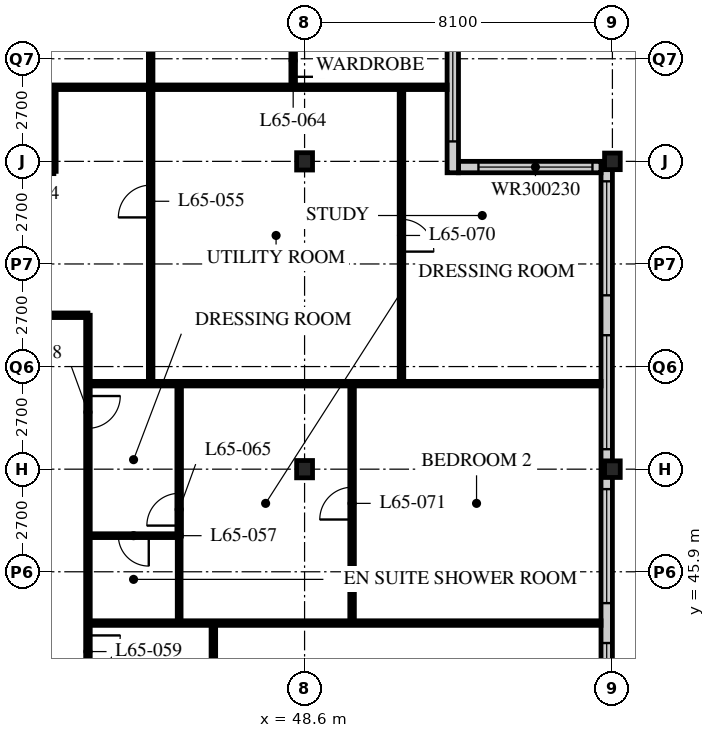
"""IFC4 building model, lengths in metres.
Left out: names, types, materials, properties, quantities, classifications, styles, units other than length and angle.
Written with IfcOpenShell. Run it as: python <this file> out.ifc"""

import sys

from ifc_helpers import new_model, si_unit, direction, frame, frame_2d, origin, origin_2d, place, context, subcontext, project, spatial, rectangle, i_section, extrude, element, fill, save


model = new_model("IFC4")
c1 = context("Model", 3, precision=1e-05, world=origin(), true_north=direction((0.0, 1.0)))
c2 = subcontext(c1, "Body", "Model", "MODEL_VIEW")
j1 = project(units=[si_unit("LENGTHUNIT", "METRE"), si_unit("PLANEANGLEUNIT", "RADIAN")], contexts=[c1])
p1 = place(None, origin())
s1 = spatial("IfcSite", under=j1, at=p1, CompositionType="ELEMENT")
p2 = place(p1, origin())
s2 = spatial("IfcBuilding", under=s1, at=p2, CompositionType="ELEMENT")
p3 = place(p2, frame((0.0, 0.0, 254.1)))
s3 = spatial("IfcBuildingStorey", under=s2, at=p3, CompositionType="ELEMENT", Elevation=254.1)
for number, where, z_axis, x_axis in (
    (1, (48.6, 48.6, 0.0), (0.0, 0.0, 1.0), (1.0, 0.0, 0.0)),
    (2, (48.6, 56.7, 0.0), (0.0, 0.0, 1.0), (1.0, 0.0, 0.0)),
):
    element("IfcColumn", number, at=place(p3, frame(where, z_axis=z_axis, x_axis=x_axis)), inside=s3, PredefinedType="COLUMN", context=c2, shape_type="SweptSolid", body=[
        extrude(i_section(OverallWidth=0.418, OverallDepth=0.456, WebThickness=0.042, FlangeThickness=0.067, FilletRadius=0.015, at=origin_2d()), origin(), (0.0, 0.0, 1.0), 3.9),
    ])
for number, where, z_axis, x_axis in (
    (3, (56.7, 48.6, 0.0), (0.0, 0.0, 1.0), (1.0, 0.0, 0.0)),
    (4, (56.7, 56.7, 0.0), (0.0, 0.0, 1.0), (1.0, 0.0, 0.0)),
):
    element("IfcColumn", number, at=place(p3, frame(where, z_axis=z_axis, x_axis=x_axis)), inside=s3, PredefinedType="COLUMN", context=c2, shape_type="SweptSolid", body=[
        extrude(i_section(OverallWidth=0.412, OverallDepth=0.437, WebThickness=0.036, FlangeThickness=0.058, FilletRadius=0.015, at=origin_2d()), origin(), (0.0, 0.0, 1.0), 3.9),
    ])
p4 = place(p3, frame((56.55, 24.6, 0.0), z_axis=(0.0, 0.0, 1.0), x_axis=(0.0, 1.0, 0.0)))
e5 = element("IfcWall", 5, at=p4, inside=s3, PredefinedType="SOLIDWALL", context=c2, shape_type="SweptSolid", body=[
    extrude(rectangle(XDim=32.1, YDim=0.3, at=frame_2d((16.05, 0.0))), origin(), (0.0, 0.0, 1.0), 3.69),
])
p5 = place(p4, frame((0.225, 0.0, 0.6)))
e6 = element("IfcOpeningElement", 6, at=p5, cuts=e5, PredefinedType="OPENING", context=c2, shape_type="SweptSolid", body=[
    extrude(rectangle(XDim=3.0, YDim=2.4, at=frame_2d((1.5, 1.2))), frame((0.0, 0.16, 0.0), z_axis=(0.0, -1.0, 0.0), x_axis=(1.0, 0.0, 0.0)), (0.0, 0.0, 1.0), 0.32),
])
p6 = place(p4, frame((4.275, 0.0, 0.6)))
e7 = element("IfcOpeningElement", 7, at=p6, cuts=e5, PredefinedType="OPENING", context=c2, shape_type="SweptSolid", body=[
    extrude(rectangle(XDim=3.0, YDim=2.4, at=frame_2d((1.5, 1.2))), frame((0.0, 0.16, 0.0), z_axis=(0.0, -1.0, 0.0), x_axis=(1.0, 0.0, 0.0)), (0.0, 0.0, 1.0), 0.32),
])
p7 = place(p4, frame((8.325, 0.0, 0.6)))
e8 = element("IfcOpeningElement", 8, at=p7, cuts=e5, PredefinedType="OPENING", context=c2, shape_type="SweptSolid", body=[
    extrude(rectangle(XDim=3.0, YDim=2.4, at=frame_2d((1.5, 1.2))), frame((0.0, 0.16, 0.0), z_axis=(0.0, -1.0, 0.0), x_axis=(1.0, 0.0, 0.0)), (0.0, 0.0, 1.0), 0.32),
])
p8 = place(p4, frame((12.375, 0.0, 0.6)))
e9 = element("IfcOpeningElement", 9, at=p8, cuts=e5, PredefinedType="OPENING", context=c2, shape_type="SweptSolid", body=[
    extrude(rectangle(XDim=3.0, YDim=2.4, at=frame_2d((1.5, 1.2))), frame((0.0, 0.16, 0.0), z_axis=(0.0, -1.0, 0.0), x_axis=(1.0, 0.0, 0.0)), (0.0, 0.0, 1.0), 0.32),
])
p9 = place(p4, frame((16.425, 0.0, 0.6)))
e10 = element("IfcOpeningElement", 10, at=p9, cuts=e5, PredefinedType="OPENING", context=c2, shape_type="SweptSolid", body=[
    extrude(rectangle(XDim=3.0, YDim=2.4, at=frame_2d((1.5, 1.2))), frame((0.0, 0.16, 0.0), z_axis=(0.0, -1.0, 0.0), x_axis=(1.0, 0.0, 0.0)), (0.0, 0.0, 1.0), 0.32),
])
p10 = place(p4, frame((20.475, 0.0, 0.6)))
e11 = element("IfcOpeningElement", 11, at=p10, cuts=e5, PredefinedType="OPENING", context=c2, shape_type="SweptSolid", body=[
    extrude(rectangle(XDim=3.0, YDim=2.4, at=frame_2d((1.5, 1.2))), frame((0.0, 0.16, 0.0), z_axis=(0.0, -1.0, 0.0), x_axis=(1.0, 0.0, 0.0)), (0.0, 0.0, 1.0), 0.32),
])
p11 = place(p4, frame((24.525, 0.0, 0.6)))
e12 = element("IfcOpeningElement", 12, at=p11, cuts=e5, PredefinedType="OPENING", context=c2, shape_type="SweptSolid", body=[
    extrude(rectangle(XDim=3.0, YDim=2.4, at=frame_2d((1.5, 1.2))), frame((0.0, 0.16, 0.0), z_axis=(0.0, -1.0, 0.0), x_axis=(1.0, 0.0, 0.0)), (0.0, 0.0, 1.0), 0.32),
])
p12 = place(p4, frame((28.575, 0.0, 0.6)))
e13 = element("IfcOpeningElement", 13, at=p12, cuts=e5, PredefinedType="OPENING", context=c2, shape_type="SweptSolid", body=[
    extrude(rectangle(XDim=3.0, YDim=2.4, at=frame_2d((1.5, 1.2))), frame((0.0, 0.16, 0.0), z_axis=(0.0, -1.0, 0.0), x_axis=(1.0, 0.0, 0.0)), (0.0, 0.0, 1.0), 0.32),
])
p13 = place(p3, frame((56.4, 56.55, 0.0), z_axis=(0.0, 0.0, 1.0), x_axis=(-1.0, 0.0, 0.0)))
e14 = element("IfcWall", 14, at=p13, inside=s3, PredefinedType="SOLIDWALL", context=c2, shape_type="SweptSolid", body=[
    extrude(rectangle(XDim=3.75, YDim=0.3, at=frame_2d((1.875, 0.0))), origin(), (0.0, 0.0, 1.0), 3.69),
])
p14 = place(p13, frame((0.225, 0.0, 0.6)))
e15 = element("IfcOpeningElement", 15, at=p14, cuts=e14, PredefinedType="OPENING", context=c2, shape_type="SweptSolid", body=[
    extrude(rectangle(XDim=3.0, YDim=2.3, at=frame_2d((1.5, 1.15))), frame((0.0, 0.16, 0.0), z_axis=(0.0, -1.0, 0.0), x_axis=(1.0, 0.0, 0.0)), (0.0, 0.0, 1.0), 0.32),
])
p15 = place(p3, frame((52.5, 56.4, 0.0), z_axis=(0.0, 0.0, 1.0), x_axis=(0.0, 1.0, 0.0)))
e16 = element("IfcWall", 16, at=p15, inside=s3, PredefinedType="SOLIDWALL", context=c2, shape_type="SweptSolid", body=[
    extrude(rectangle(XDim=4.35, YDim=0.3, at=frame_2d((2.175, 0.0))), origin(), (0.0, 0.0, 1.0), 3.69),
])
p16 = place(p15, frame((0.825, 0.0, 0.6)))
e17 = element("IfcOpeningElement", 17, at=p16, cuts=e16, PredefinedType="OPENING", context=c2, shape_type="SweptSolid", body=[
    extrude(rectangle(XDim=3.0, YDim=2.3, at=frame_2d((1.5, 1.15))), frame((0.0, 0.16, 0.0), z_axis=(0.0, -1.0, 0.0), x_axis=(1.0, 0.0, 0.0)), (0.0, 0.0, 1.0), 0.32),
])
p17 = place(p3, frame((42.9, 52.65, 0.0), z_axis=(0.0, 0.0, 1.0), x_axis=(0.0, -1.0, 0.0)))
e18 = element("IfcWall", 18, at=p17, inside=s3, PredefinedType="PARTITIONING", context=c2, shape_type="SweptSolid", body=[
    extrude(rectangle(XDim=16.2, YDim=0.12, at=frame_2d((8.1, 0.0))), origin(), (0.0, 0.0, 1.0), 3.69),
])
p18 = place(p17, frame((2.125, 0.0, 0.0)))
e19 = element("IfcOpeningElement", 19, at=p18, cuts=e18, PredefinedType="OPENING", context=c2, shape_type="SweptSolid", body=[
    extrude(rectangle(XDim=0.85, YDim=2.1, at=frame_2d((0.425, 1.05))), frame((0.0, 0.07, 0.0), z_axis=(0.0, -1.0, 0.0), x_axis=(1.0, 0.0, 0.0)), (0.0, 0.0, 1.0), 0.14),
])
p19 = place(p17, frame((8.425, 0.0, 0.0)))
e20 = element("IfcOpeningElement", 20, at=p19, cuts=e18, PredefinedType="OPENING", context=c2, shape_type="SweptSolid", body=[
    extrude(rectangle(XDim=0.85, YDim=2.1, at=frame_2d((0.425, 1.05))), frame((0.0, 0.07, 0.0), z_axis=(0.0, -1.0, 0.0), x_axis=(1.0, 0.0, 0.0)), (0.0, 0.0, 1.0), 0.14),
])
p20 = place(p17, frame((12.475, 0.0, 0.0)))
e21 = element("IfcOpeningElement", 21, at=p20, cuts=e18, PredefinedType="OPENING", context=c2, shape_type="SweptSolid", body=[
    extrude(rectangle(XDim=0.85, YDim=2.1, at=frame_2d((0.425, 1.05))), frame((0.0, 0.07, 0.0), z_axis=(0.0, -1.0, 0.0), x_axis=(1.0, 0.0, 0.0)), (0.0, 0.0, 1.0), 0.14),
])
p21 = place(p3, frame((36.45, 52.65, 0.0), z_axis=(0.0, 0.0, 1.0), x_axis=(1.0, 0.0, 0.0)))
e22 = element("IfcWall", 22, at=p21, inside=s3, PredefinedType="PARTITIONING", context=c2, shape_type="SweptSolid", body=[
    extrude(rectangle(XDim=6.45, YDim=0.12, at=frame_2d((3.225, 0.0))), origin(), (0.0, 0.0, 1.0), 3.69),
])
p22 = place(p21, frame((2.8, 0.0, 0.0)))
e23 = element("IfcOpeningElement", 23, at=p22, cuts=e22, PredefinedType="OPENING", context=c2, shape_type="SweptSolid", body=[
    extrude(rectangle(XDim=0.85, YDim=2.1, at=frame_2d((0.425, 1.05))), frame((0.0, 0.07, 0.0), z_axis=(0.0, -1.0, 0.0), x_axis=(1.0, 0.0, 0.0)), (0.0, 0.0, 1.0), 0.14),
])
p23 = place(p3, frame((42.9, 50.85, 0.0), z_axis=(0.0, 0.0, 1.0), x_axis=(1.0, 0.0, 0.0)))
e24 = element("IfcWall", 24, at=p23, inside=s3, PredefinedType="PARTITIONING", context=c2, shape_type="SweptSolid", body=[
    extrude(rectangle(XDim=13.5, YDim=0.12, at=frame_2d((6.75, 0.0))), origin(), (0.0, 0.0, 1.0), 3.69),
])
p24 = place(p3, frame((36.45, 58.65, 0.0), z_axis=(0.0, 0.0, 1.0), x_axis=(1.0, 0.0, 0.0)))
e25 = element("IfcWall", 25, at=p24, inside=s3, PredefinedType="PARTITIONING", context=c2, shape_type="SweptSolid", body=[
    extrude(rectangle(XDim=15.9, YDim=0.12, at=frame_2d((7.95, 0.0))), origin(), (0.0, 0.0, 1.0), 3.69),
])
p25 = place(p24, frame((1.675, 0.0, 0.0)))
e26 = element("IfcOpeningElement", 26, at=p25, cuts=e25, PredefinedType="OPENING", context=c2, shape_type="SweptSolid", body=[
    extrude(rectangle(XDim=0.85, YDim=2.1, at=frame_2d((0.425, 1.05))), frame((0.0, 0.07, 0.0), z_axis=(0.0, -1.0, 0.0), x_axis=(1.0, 0.0, 0.0)), (0.0, 0.0, 1.0), 0.14),
])
p26 = place(p3, frame((44.55, 64.5, 0.0), z_axis=(0.0, 0.0, 1.0), x_axis=(0.0, -1.0, 0.0)))
e27 = element("IfcWall", 27, at=p26, inside=s3, PredefinedType="PARTITIONING", context=c2, shape_type="SweptSolid", body=[
    extrude(rectangle(XDim=13.65, YDim=0.12, at=frame_2d((6.825, 0.0))), origin(), (0.0, 0.0, 1.0), 3.69),
])
p27 = place(p26, frame((8.425, 0.0, 0.0)))
e28 = element("IfcOpeningElement", 28, at=p27, cuts=e27, PredefinedType="OPENING", context=c2, shape_type="SweptSolid", body=[
    extrude(rectangle(XDim=0.85, YDim=2.1, at=frame_2d((0.425, 1.05))), frame((0.0, 0.07, 0.0), z_axis=(0.0, -1.0, 0.0), x_axis=(1.0, 0.0, 0.0)), (0.0, 0.0, 1.0), 0.14),
])
p28 = place(p26, frame((2.5, 0.0, 0.0)))
e29 = element("IfcOpeningElement", 29, at=p28, cuts=e27, PredefinedType="OPENING", context=c2, shape_type="SweptSolid", body=[
    extrude(rectangle(XDim=0.85, YDim=2.1, at=frame_2d((0.425, 1.05))), frame((0.0, 0.07, 0.0), z_axis=(0.0, -1.0, 0.0), x_axis=(1.0, 0.0, 0.0)), (0.0, 0.0, 1.0), 0.14),
])
p29 = place(p3, frame((42.9, 46.85, 0.0), z_axis=(0.0, 0.0, 1.0), x_axis=(1.0, 0.0, 0.0)))
e30 = element("IfcWall", 30, at=p29, inside=s3, PredefinedType="PARTITIONING", context=c2, shape_type="SweptSolid", body=[
    extrude(rectangle(XDim=2.4, YDim=0.1, at=frame_2d((1.2, 0.0))), origin(), (0.0, 0.0, 1.0), 3.69),
])
p30 = place(p29, frame((0.8, 0.0, 0.0)))
e31 = element("IfcOpeningElement", 31, at=p30, cuts=e30, PredefinedType="OPENING", context=c2, shape_type="SweptSolid", body=[
    extrude(rectangle(XDim=0.8, YDim=2.1, at=frame_2d((0.4, 1.05))), frame((0.0, 0.06, 0.0), z_axis=(0.0, -1.0, 0.0), x_axis=(1.0, 0.0, 0.0)), (0.0, 0.0, 1.0), 0.12),
])
p31 = place(p3, frame((45.3, 46.85, 0.0), z_axis=(0.0, 0.0, 1.0), x_axis=(0.0, -1.0, 0.0)))
e32 = element("IfcWall", 32, at=p31, inside=s3, PredefinedType="PARTITIONING", context=c2, shape_type="SweptSolid", body=[
    extrude(rectangle(XDim=2.3, YDim=0.1, at=frame_2d((1.15, 0.0))), origin(), (0.0, 0.0, 1.0), 3.69),
])
p32 = place(p3, frame((42.9, 44.55, 0.0), z_axis=(0.0, 0.0, 1.0), x_axis=(1.0, 0.0, 0.0)))
e33 = element("IfcWall", 33, at=p32, inside=s3, PredefinedType="PARTITIONING", context=c2, shape_type="SweptSolid", body=[
    extrude(rectangle(XDim=13.5, YDim=0.12, at=frame_2d((6.75, 0.0))), origin(), (0.0, 0.0, 1.0), 3.69),
])
p33 = place(p3, frame((48.3, 58.65, 0.0), z_axis=(0.0, 0.0, 1.0), x_axis=(0.0, 1.0, 0.0)))
e34 = element("IfcWall", 34, at=p33, inside=s3, PredefinedType="PARTITIONING", context=c2, shape_type="SweptSolid", body=[
    extrude(rectangle(XDim=1.8, YDim=0.12, at=frame_2d((0.9, 0.0))), origin(), (0.0, 0.0, 1.0), 3.69),
])
p34 = place(p33, frame((0.275, 0.0, 0.0)))
e35 = element("IfcOpeningElement", 35, at=p34, cuts=e34, PredefinedType="OPENING", context=c2, shape_type="SweptSolid", body=[
    extrude(rectangle(XDim=0.85, YDim=2.1, at=frame_2d((0.425, 1.05))), frame((0.0, 0.07, 0.0), z_axis=(0.0, -1.0, 0.0), x_axis=(1.0, 0.0, 0.0)), (0.0, 0.0, 1.0), 0.14),
])
p35 = place(p3, frame((45.3, 50.85, 0.0), z_axis=(0.0, 0.0, 1.0), x_axis=(0.0, -1.0, 0.0)))
e36 = element("IfcWall", 36, at=p35, inside=s3, PredefinedType="PARTITIONING", context=c2, shape_type="SweptSolid", body=[
    extrude(rectangle(XDim=4.01, YDim=0.12, at=frame_2d((2.005, 0.0))), origin(), (0.0, 0.0, 1.0), 3.69),
])
p36 = place(p35, frame((2.885, 0.0, 0.0)))
e37 = element("IfcOpeningElement", 37, at=p36, cuts=e36, PredefinedType="OPENING", context=c2, shape_type="SweptSolid", body=[
    extrude(rectangle(XDim=0.85, YDim=2.1, at=frame_2d((0.425, 1.05))), frame((0.0, 0.07, 0.0), z_axis=(0.0, -1.0, 0.0), x_axis=(1.0, 0.0, 0.0)), (0.0, 0.0, 1.0), 0.14),
])
p37 = place(p3, frame((46.2, 28.35, 0.0), z_axis=(0.0, 0.0, 1.0), x_axis=(0.0, 1.0, 0.0)))
e38 = element("IfcWall", 38, at=p37, inside=s3, PredefinedType="PARTITIONING", context=c2, shape_type="SweptSolid", body=[
    extrude(rectangle(XDim=16.2, YDim=0.12, at=frame_2d((8.1, 0.0))), origin(), (0.0, 0.0, 1.0), 3.69),
])
p38 = place(p37, frame((1.6, 0.0, 0.0)))
e39 = element("IfcOpeningElement", 39, at=p38, cuts=e38, PredefinedType="OPENING", context=c2, shape_type="SweptSolid", body=[
    extrude(rectangle(XDim=0.85, YDim=2.1, at=frame_2d((0.425, 1.05))), frame((0.0, 0.07, 0.0), z_axis=(0.0, -1.0, 0.0), x_axis=(1.0, 0.0, 0.0)), (0.0, 0.0, 1.0), 0.14),
])
p39 = place(p37, frame((5.65, 0.0, 0.0)))
e40 = element("IfcOpeningElement", 40, at=p39, cuts=e38, PredefinedType="OPENING", context=c2, shape_type="SweptSolid", body=[
    extrude(rectangle(XDim=0.85, YDim=2.1, at=frame_2d((0.425, 1.05))), frame((0.0, 0.07, 0.0), z_axis=(0.0, -1.0, 0.0), x_axis=(1.0, 0.0, 0.0)), (0.0, 0.0, 1.0), 0.14),
])
p40 = place(p37, frame((13.75, 0.0, 0.0)))
e41 = element("IfcOpeningElement", 41, at=p40, cuts=e38, PredefinedType="OPENING", context=c2, shape_type="SweptSolid", body=[
    extrude(rectangle(XDim=0.85, YDim=2.1, at=frame_2d((0.425, 1.05))), frame((0.0, 0.07, 0.0), z_axis=(0.0, -1.0, 0.0), x_axis=(1.0, 0.0, 0.0)), (0.0, 0.0, 1.0), 0.14),
])
p41 = place(p37, frame((9.7, 0.0, 0.0)))
e42 = element("IfcOpeningElement", 42, at=p41, cuts=e38, PredefinedType="OPENING", context=c2, shape_type="SweptSolid", body=[
    extrude(rectangle(XDim=0.85, YDim=2.1, at=frame_2d((0.425, 1.05))), frame((0.0, 0.07, 0.0), z_axis=(0.0, -1.0, 0.0), x_axis=(1.0, 0.0, 0.0)), (0.0, 0.0, 1.0), 0.14),
])
p42 = place(p3, frame((51.15, 50.85, 0.0), z_axis=(0.0, 0.0, 1.0), x_axis=(0.0, 1.0, 0.0)))
e43 = element("IfcWall", 43, at=p42, inside=s3, PredefinedType="PARTITIONING", context=c2, shape_type="SweptSolid", body=[
    extrude(rectangle(XDim=7.8, YDim=0.12, at=frame_2d((3.9, 0.0))), origin(), (0.0, 0.0, 1.0), 3.69),
])
p43 = place(p42, frame((3.475, 0.0, 0.0)))
e44 = element("IfcOpeningElement", 44, at=p43, cuts=e43, PredefinedType="OPENING", context=c2, shape_type="SweptSolid", body=[
    extrude(rectangle(XDim=0.85, YDim=2.1, at=frame_2d((0.425, 1.05))), frame((0.0, 0.07, 0.0), z_axis=(0.0, -1.0, 0.0), x_axis=(1.0, 0.0, 0.0)), (0.0, 0.0, 1.0), 0.14),
])
p44 = place(p3, frame((49.85, 44.55, 0.0), z_axis=(0.0, 0.0, 1.0), x_axis=(0.0, 1.0, 0.0)))
e45 = element("IfcWall", 45, at=p44, inside=s3, PredefinedType="PARTITIONING", context=c2, shape_type="SweptSolid", body=[
    extrude(rectangle(XDim=6.3, YDim=0.12, at=frame_2d((3.15, 0.0))), origin(), (0.0, 0.0, 1.0), 3.69),
])
p45 = place(p44, frame((2.725, 0.0, 0.0)))
e46 = element("IfcOpeningElement", 46, at=p45, cuts=e45, PredefinedType="OPENING", context=c2, shape_type="SweptSolid", body=[
    extrude(rectangle(XDim=0.85, YDim=2.1, at=frame_2d((0.425, 1.05))), frame((0.0, 0.07, 0.0), z_axis=(0.0, -1.0, 0.0), x_axis=(1.0, 0.0, 0.0)), (0.0, 0.0, 1.0), 0.14),
])
p46 = place(p3, frame((42.003, 58.65, 0.0), z_axis=(0.0, 0.0, 1.0), x_axis=(0.0, -1.0, 0.0)))
e47 = element("IfcWall", 47, at=p46, inside=s3, PredefinedType="PARTITIONING", context=c2, shape_type="SweptSolid", body=[
    extrude(rectangle(XDim=2.213, YDim=0.12, at=frame_2d((1.106, 0.0))), origin(), (0.0, 0.0, 1.0), 3.69),
])
p47 = place(p3, frame((39.997, 56.437, 0.0), z_axis=(0.0, 0.0, 1.0), x_axis=(1.0, 0.0, 0.0)))
e48 = element("IfcWall", 48, at=p47, inside=s3, PredefinedType="PARTITIONING", context=c2, shape_type="SweptSolid", body=[
    extrude(rectangle(XDim=2.006, YDim=0.12, at=frame_2d((1.003, 0.0))), origin(), (0.0, 0.0, 1.0), 3.69),
])
p48 = place(p47, frame((0.831, 0.0, 0.0)))
e49 = element("IfcOpeningElement", 49, at=p48, cuts=e48, PredefinedType="OPENING", context=c2, shape_type="SweptSolid", body=[
    extrude(rectangle(XDim=0.85, YDim=2.1, at=frame_2d((0.425, 1.05))), frame((0.0, 0.07, 0.0), z_axis=(0.0, -1.0, 0.0), x_axis=(1.0, 0.0, 0.0)), (0.0, 0.0, 1.0), 0.14),
])
p49 = place(p9, origin())
e50 = element("IfcWindow", 50, at=p49, inside=s3, PartitioningType="SINGLE_PANEL", PredefinedType="WINDOW", context=c2, shape_type="SweptSolid", body=[
    extrude(rectangle(XDim=3.0, YDim=2.4, at=frame_2d((1.5, 1.2))), frame((0.0, 0.03, 0.0), z_axis=(0.0, -1.0, 0.0), x_axis=(1.0, 0.0, 0.0)), (0.0, 0.0, 1.0), 0.06),
])
fill(e10, e50)
p50 = place(p10, origin())
e51 = element("IfcWindow", 51, at=p50, inside=s3, PartitioningType="SINGLE_PANEL", PredefinedType="WINDOW", context=c2, shape_type="SweptSolid", body=[
    extrude(rectangle(XDim=3.0, YDim=2.4, at=frame_2d((1.5, 1.2))), frame((0.0, 0.03, 0.0), z_axis=(0.0, -1.0, 0.0), x_axis=(1.0, 0.0, 0.0)), (0.0, 0.0, 1.0), 0.06),
])
fill(e11, e51)
p51 = place(p11, origin())
e52 = element("IfcWindow", 52, at=p51, inside=s3, PartitioningType="SINGLE_PANEL", PredefinedType="WINDOW", context=c2, shape_type="SweptSolid", body=[
    extrude(rectangle(XDim=3.0, YDim=2.4, at=frame_2d((1.5, 1.2))), frame((0.0, 0.03, 0.0), z_axis=(0.0, -1.0, 0.0), x_axis=(1.0, 0.0, 0.0)), (0.0, 0.0, 1.0), 0.06),
])
fill(e12, e52)
p52 = place(p12, origin())
e53 = element("IfcWindow", 53, at=p52, inside=s3, PartitioningType="SINGLE_PANEL", PredefinedType="WINDOW", context=c2, shape_type="SweptSolid", body=[
    extrude(rectangle(XDim=3.0, YDim=2.4, at=frame_2d((1.5, 1.2))), frame((0.0, 0.03, 0.0), z_axis=(0.0, -1.0, 0.0), x_axis=(1.0, 0.0, 0.0)), (0.0, 0.0, 1.0), 0.06),
])
fill(e13, e53)
p53 = place(p14, origin())
e54 = element("IfcWindow", 54, at=p53, inside=s3, PartitioningType="SINGLE_PANEL", PredefinedType="WINDOW", context=c2, shape_type="SweptSolid", body=[
    extrude(rectangle(XDim=3.0, YDim=2.3, at=frame_2d((1.5, 1.15))), frame((0.0, 0.03, 0.0), z_axis=(0.0, -1.0, 0.0), x_axis=(1.0, 0.0, 0.0)), (0.0, 0.0, 1.0), 0.06),
])
fill(e15, e54)
p54 = place(p16, origin())
e55 = element("IfcWindow", 55, at=p54, inside=s3, PartitioningType="SINGLE_PANEL", PredefinedType="WINDOW", context=c2, shape_type="SweptSolid", body=[
    extrude(rectangle(XDim=3.0, YDim=2.3, at=frame_2d((1.5, 1.15))), frame((0.0, 0.03, 0.0), z_axis=(0.0, -1.0, 0.0), x_axis=(1.0, 0.0, 0.0)), (0.0, 0.0, 1.0), 0.06),
])
fill(e17, e55)
p55 = place(p27, origin())
e56 = element("IfcDoor", 56, at=p55, inside=s3, OperationType="SINGLE_SWING_LEFT", PredefinedType="DOOR", context=c2, shape_type="SweptSolid", body=[
    extrude(rectangle(XDim=0.85, YDim=2.1, at=frame_2d((0.425, 1.05))), frame((0.0, 0.025, 0.0), z_axis=(0.0, -1.0, 0.0), x_axis=(1.0, 0.0, 0.0)), (0.0, 0.0, 1.0), 0.05),
])
fill(e28, e56)
p56 = place(p30, origin())
e57 = element("IfcDoor", 57, at=p56, inside=s3, OperationType="SINGLE_SWING_LEFT", PredefinedType="DOOR", context=c2, shape_type="SweptSolid", body=[
    extrude(rectangle(XDim=0.8, YDim=2.1, at=frame_2d((0.4, 1.05))), frame((0.0, 0.025, 0.0), z_axis=(0.0, -1.0, 0.0), x_axis=(1.0, 0.0, 0.0)), (0.0, 0.0, 1.0), 0.05),
])
fill(e31, e57)
p57 = place(p18, origin())
e58 = element("IfcDoor", 58, at=p57, inside=s3, OperationType="SINGLE_SWING_LEFT", PredefinedType="DOOR", context=c2, shape_type="SweptSolid", body=[
    extrude(rectangle(XDim=0.85, YDim=2.1, at=frame_2d((0.425, 1.05))), frame((0.0, 0.025, 0.0), z_axis=(0.0, -1.0, 0.0), x_axis=(1.0, 0.0, 0.0)), (0.0, 0.0, 1.0), 0.05),
])
fill(e19, e58)
p58 = place(p19, origin())
e59 = element("IfcDoor", 59, at=p58, inside=s3, OperationType="SINGLE_SWING_LEFT", PredefinedType="DOOR", context=c2, shape_type="SweptSolid", body=[
    extrude(rectangle(XDim=0.85, YDim=2.1, at=frame_2d((0.425, 1.05))), frame((0.0, 0.025, 0.0), z_axis=(0.0, -1.0, 0.0), x_axis=(1.0, 0.0, 0.0)), (0.0, 0.0, 1.0), 0.05),
])
fill(e20, e59)
p59 = place(p34, origin())
e60 = element("IfcDoor", 60, at=p59, inside=s3, OperationType="SINGLE_SWING_RIGHT", PredefinedType="DOOR", context=c2, shape_type="SweptSolid", body=[
    extrude(rectangle(XDim=0.85, YDim=2.1, at=frame_2d((0.425, 1.05))), frame((0.0, 0.025, 0.0), z_axis=(0.0, -1.0, 0.0), x_axis=(1.0, 0.0, 0.0)), (0.0, 0.0, 1.0), 0.05),
])
fill(e35, e60)
p60 = place(p36, origin())
e61 = element("IfcDoor", 61, at=p60, inside=s3, OperationType="SINGLE_SWING_LEFT", PredefinedType="DOOR", context=c2, shape_type="SweptSolid", body=[
    extrude(rectangle(XDim=0.85, YDim=2.1, at=frame_2d((0.425, 1.05))), frame((0.0, 0.025, 0.0), z_axis=(0.0, -1.0, 0.0), x_axis=(1.0, 0.0, 0.0)), (0.0, 0.0, 1.0), 0.05),
])
fill(e37, e61)
p61 = place(p43, origin())
e62 = element("IfcDoor", 62, at=p61, inside=s3, OperationType="SINGLE_SWING_RIGHT", PredefinedType="DOOR", context=c2, shape_type="SweptSolid", body=[
    extrude(rectangle(XDim=0.85, YDim=2.1, at=frame_2d((0.425, 1.05))), frame((0.0, 0.025, 0.0), z_axis=(0.0, -1.0, 0.0), x_axis=(1.0, 0.0, 0.0)), (0.0, 0.0, 1.0), 0.05),
])
fill(e44, e62)
p62 = place(p45, origin())
e63 = element("IfcDoor", 63, at=p62, inside=s3, OperationType="SINGLE_SWING_LEFT", PredefinedType="DOOR", context=c2, shape_type="SweptSolid", body=[
    extrude(rectangle(XDim=0.85, YDim=2.1, at=frame_2d((0.425, 1.05))), frame((0.0, 0.025, 0.0), z_axis=(0.0, -1.0, 0.0), x_axis=(1.0, 0.0, 0.0)), (0.0, 0.0, 1.0), 0.05),
])
fill(e46, e63)
save(model, sys.argv[1])
